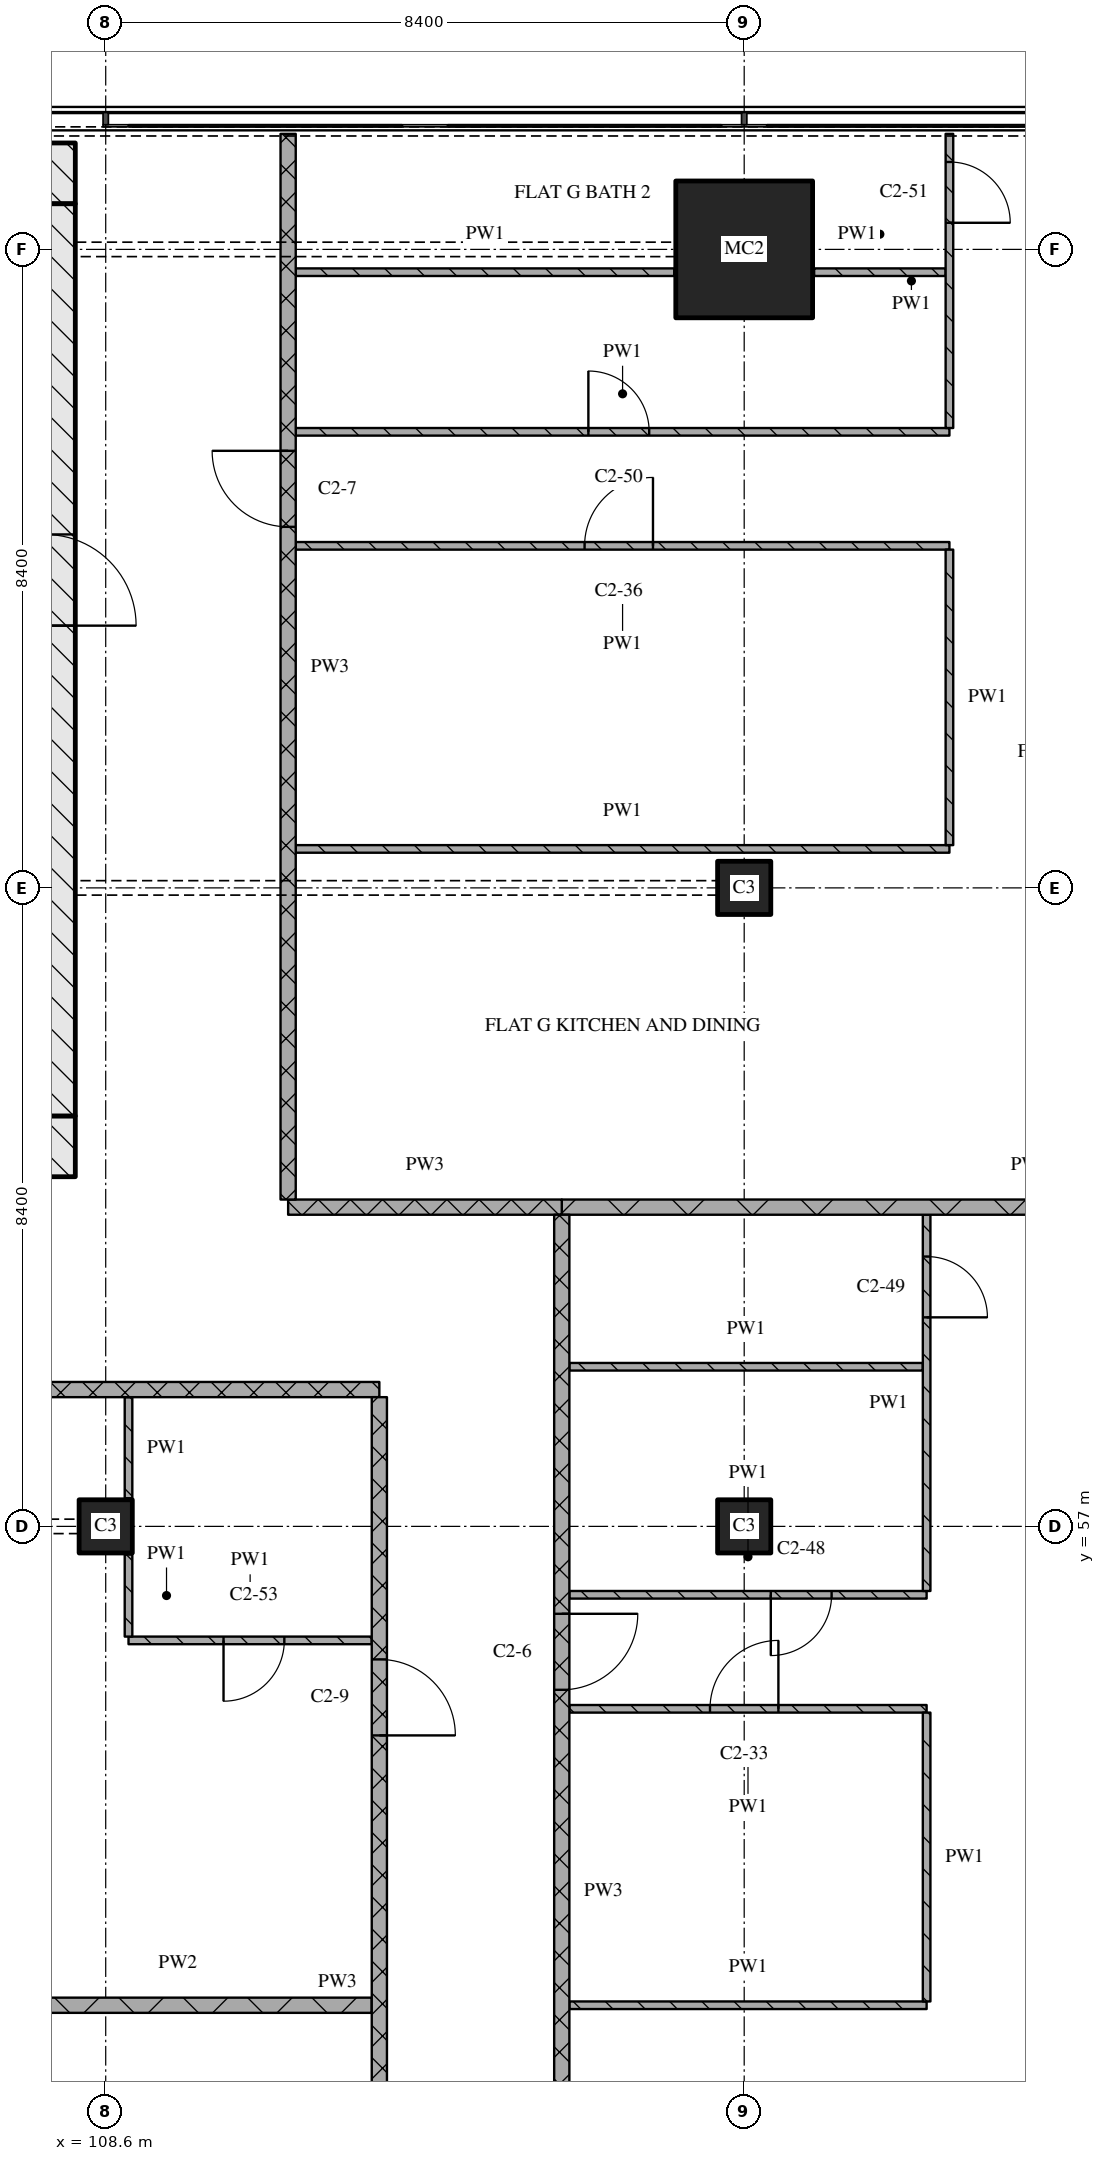
"""IFC4 building model, lengths in metres.
Left out: names, types, materials, properties, quantities, classifications, styles, units other than length and angle.
Written with IfcOpenShell. Run it as: python <this file> out.ifc"""

import sys

from ifc_helpers import new_model, si_unit, direction, frame, frame_2d, origin, origin_2d, place, context, subcontext, project, spatial, rectangle, extrude, element, fill, save


model = new_model("IFC4")
c1 = context("Model", 3, precision=1e-05, world=origin(), true_north=direction((0.0, 1.0)))
c2 = subcontext(c1, "Body", "Model", "MODEL_VIEW")
j1 = project(units=[si_unit("LENGTHUNIT", "METRE"), si_unit("PLANEANGLEUNIT", "RADIAN")], contexts=[c1])
p1 = place(None, origin())
s1 = spatial("IfcSite", under=j1, at=p1, CompositionType="ELEMENT")
p2 = place(p1, origin())
s2 = spatial("IfcBuilding", under=s1, at=p2, CompositionType="ELEMENT")
p3 = place(p2, frame((0.0, 0.0, 158.25)))
s3 = spatial("IfcBuildingStorey", under=s2, at=p3, CompositionType="ELEMENT", Elevation=158.25)
for number, where, z_axis, x_axis in (
    (1, (108.6, 57.0, 0.0), (0.0, 0.0, 1.0), (1.0, 0.0, 0.0)),
    (2, (117.0, 57.0, 0.0), (0.0, 0.0, 1.0), (1.0, 0.0, 0.0)),
    (3, (117.0, 65.4, 0.0), (0.0, 0.0, 1.0), (1.0, 0.0, 0.0)),
):
    element("IfcColumn", number, at=place(p3, frame(where, z_axis=z_axis, x_axis=x_axis)), inside=s3, PredefinedType="COLUMN", context=c2, shape_type="SweptSolid", body=[
        extrude(rectangle(XDim=0.7, YDim=0.7, at=origin_2d()), origin(), (0.0, 0.0, 1.0), 3.6),
    ])
p4 = place(p3, frame((117.0, 73.8, 0.0), z_axis=(0.0, 0.0, 1.0), x_axis=(1.0, 0.0, 0.0)))
e4 = element("IfcColumn", 4, at=p4, inside=s3, PredefinedType="COLUMN", context=c2, shape_type="SweptSolid", body=[
    extrude(rectangle(XDim=1.8, YDim=1.8, at=origin_2d()), origin(), (0.0, 0.0, 1.0), 3.6),
])
p5 = place(p3, frame((67.0, 62.0, 0.0), z_axis=(0.0, 0.0, 1.0), x_axis=(1.0, 0.0, 0.0)))
e5 = element("IfcWall", 5, at=p5, inside=s3, PredefinedType="SOLIDWALL", context=c2, shape_type="SweptSolid", body=[
    extrude(rectangle(XDim=41.2, YDim=0.8, at=frame_2d((20.6, 0.0))), origin(), (0.0, 0.0, 1.0), 3.32),
])
p6 = place(p5, frame((20.95, 0.0, 0.0)))
e6 = element("IfcOpeningElement", 6, at=p6, cuts=e5, PredefinedType="OPENING", context=c2, shape_type="SweptSolid", body=[
    extrude(rectangle(XDim=1.8, YDim=2.1, at=frame_2d((0.9, 1.05))), frame((0.0, 0.41, 0.0), z_axis=(0.0, -1.0, 0.0), x_axis=(1.0, 0.0, 0.0)), (0.0, 0.0, 1.0), 0.82),
])
p7 = place(p3, frame((67.0, 74.8, 0.0), z_axis=(0.0, 0.0, 1.0), x_axis=(1.0, 0.0, 0.0)))
e7 = element("IfcWall", 7, at=p7, inside=s3, PredefinedType="SOLIDWALL", context=c2, shape_type="SweptSolid", body=[
    extrude(rectangle(XDim=41.2, YDim=0.8, at=frame_2d((20.6, 0.0))), origin(), (0.0, 0.0, 1.0), 3.32),
])
p8 = place(p3, frame((107.8, 62.4, 0.0), z_axis=(0.0, 0.0, 1.0), x_axis=(0.0, 1.0, 0.0)))
e8 = element("IfcWall", 8, at=p8, inside=s3, PredefinedType="SOLIDWALL", context=c2, shape_type="SweptSolid", body=[
    extrude(rectangle(XDim=12.0, YDim=0.8, at=frame_2d((6.0, 0.0))), origin(), (0.0, 0.0, 1.0), 3.32),
])
p9 = place(p8, frame((6.45, 0.0, 0.0)))
e9 = element("IfcOpeningElement", 9, at=p9, cuts=e8, PredefinedType="OPENING", context=c2, shape_type="SweptSolid", body=[
    extrude(rectangle(XDim=1.2, YDim=2.1, at=frame_2d((0.6, 1.05))), frame((0.0, 0.41, 0.0), z_axis=(0.0, -1.0, 0.0), x_axis=(1.0, 0.0, 0.0)), (0.0, 0.0, 1.0), 0.82),
])
p10 = place(p3, frame((107.0, 50.7, 0.0), z_axis=(0.0, 0.0, 1.0), x_axis=(1.0, 0.0, 0.0)))
e10 = element("IfcWall", 10, at=p10, inside=s3, PredefinedType="PARTITIONING", context=c2, shape_type="SweptSolid", body=[
    extrude(rectangle(XDim=5.1, YDim=0.2, at=frame_2d((2.55, 0.0))), origin(), (0.0, 0.0, 1.0), 3.32),
])
p11 = place(p3, frame((114.7, 50.7, 0.0), z_axis=(0.0, 0.0, 1.0), x_axis=(1.0, 0.0, 0.0)))
e11 = element("IfcWall", 11, at=p11, inside=s3, PredefinedType="PARTITIONING", context=c2, shape_type="SweptSolid", body=[
    extrude(rectangle(XDim=4.7, YDim=0.1, at=frame_2d((2.35, 0.0))), origin(), (0.0, 0.0, 1.0), 3.32),
])
p12 = place(p3, frame((119.4, 54.6, 0.0), z_axis=(0.0, 0.0, 1.0), x_axis=(-1.0, 0.0, 0.0)))
e12 = element("IfcWall", 12, at=p12, inside=s3, PredefinedType="PARTITIONING", context=c2, shape_type="SweptSolid", body=[
    extrude(rectangle(XDim=4.7, YDim=0.1, at=frame_2d((2.35, 0.0))), origin(), (0.0, 0.0, 1.0), 3.32),
])
p13 = place(p12, frame((1.95, 0.0, 0.0)))
e13 = element("IfcOpeningElement", 13, at=p13, cuts=e12, PredefinedType="OPENING", context=c2, shape_type="SweptSolid", body=[
    extrude(rectangle(XDim=0.9, YDim=2.1, at=frame_2d((0.45, 1.05))), frame((0.0, 0.06, 0.0), z_axis=(0.0, -1.0, 0.0), x_axis=(1.0, 0.0, 0.0)), (0.0, 0.0, 1.0), 0.12),
])
p14 = place(p3, frame((108.9, 55.5, 0.0), z_axis=(0.0, 0.0, 1.0), x_axis=(1.0, 0.0, 0.0)))
e14 = element("IfcWall", 14, at=p14, inside=s3, PredefinedType="PARTITIONING", context=c2, shape_type="SweptSolid", body=[
    extrude(rectangle(XDim=3.2, YDim=0.1, at=frame_2d((1.6, 0.0))), origin(), (0.0, 0.0, 1.0), 3.32),
])
p15 = place(p14, frame((1.25, 0.0, 0.0)))
e15 = element("IfcOpeningElement", 15, at=p15, cuts=e14, PredefinedType="OPENING", context=c2, shape_type="SweptSolid", body=[
    extrude(rectangle(XDim=0.8, YDim=2.1, at=frame_2d((0.4, 1.05))), frame((0.0, 0.06, 0.0), z_axis=(0.0, -1.0, 0.0), x_axis=(1.0, 0.0, 0.0)), (0.0, 0.0, 1.0), 0.12),
])
p16 = place(p3, frame((114.7, 56.1, 0.0), z_axis=(0.0, 0.0, 1.0), x_axis=(1.0, 0.0, 0.0)))
e16 = element("IfcWall", 16, at=p16, inside=s3, PredefinedType="PARTITIONING", context=c2, shape_type="SweptSolid", body=[
    extrude(rectangle(XDim=4.7, YDim=0.1, at=frame_2d((2.35, 0.0))), origin(), (0.0, 0.0, 1.0), 3.32),
])
p17 = place(p16, frame((2.65, 0.0, 0.0)))
e17 = element("IfcOpeningElement", 17, at=p17, cuts=e16, PredefinedType="OPENING", context=c2, shape_type="SweptSolid", body=[
    extrude(rectangle(XDim=0.8, YDim=2.1, at=frame_2d((0.4, 1.05))), frame((0.0, 0.06, 0.0), z_axis=(0.0, -1.0, 0.0), x_axis=(1.0, 0.0, 0.0)), (0.0, 0.0, 1.0), 0.12),
])
p18 = place(p3, frame((101.4, 58.8, 0.0), z_axis=(0.0, 0.0, 1.0), x_axis=(1.0, 0.0, 0.0)))
e18 = element("IfcWall", 18, at=p18, inside=s3, PredefinedType="PARTITIONING", context=c2, shape_type="SweptSolid", body=[
    extrude(rectangle(XDim=10.8, YDim=0.2, at=frame_2d((5.4, 0.0))), origin(), (0.0, 0.0, 1.0), 3.32),
])
p19 = place(p3, frame((114.7, 59.1, 0.0), z_axis=(0.0, 0.0, 1.0), x_axis=(1.0, 0.0, 0.0)))
e19 = element("IfcWall", 19, at=p19, inside=s3, PredefinedType="PARTITIONING", context=c2, shape_type="SweptSolid", body=[
    extrude(rectangle(XDim=4.65, YDim=0.1, at=frame_2d((2.325, 0.0))), origin(), (0.0, 0.0, 1.0), 3.32),
])
p20 = place(p3, frame((111.0, 61.2, 0.0), z_axis=(0.0, 0.0, 1.0), x_axis=(1.0, 0.0, 0.0)))
e20 = element("IfcWall", 20, at=p20, inside=s3, PredefinedType="PARTITIONING", context=c2, shape_type="SweptSolid", body=[
    extrude(rectangle(XDim=3.6, YDim=0.2, at=frame_2d((1.8, 0.0))), origin(), (0.0, 0.0, 1.0), 3.32),
])
p21 = place(p3, frame((114.6, 61.2, 0.0), z_axis=(0.0, 0.0, 1.0), x_axis=(1.0, 0.0, 0.0)))
e21 = element("IfcWall", 21, at=p21, inside=s3, PredefinedType="PARTITIONING", context=c2, shape_type="SweptSolid", body=[
    extrude(rectangle(XDim=12.32, YDim=0.2, at=frame_2d((6.16, 0.0))), origin(), (0.0, 0.0, 1.0), 3.32),
])
p22 = place(p3, frame((111.1, 65.913, 0.0), z_axis=(0.0, 0.0, 1.0), x_axis=(1.0, 0.0, 0.0)))
e22 = element("IfcWall", 22, at=p22, inside=s3, PredefinedType="PARTITIONING", context=c2, shape_type="SweptSolid", body=[
    extrude(rectangle(XDim=8.6, YDim=0.1, at=frame_2d((4.3, 0.0))), origin(), (0.0, 0.0, 1.0), 3.32),
])
p23 = place(p3, frame((119.7, 69.9, 0.0), z_axis=(0.0, 0.0, 1.0), x_axis=(-1.0, 0.0, 0.0)))
e23 = element("IfcWall", 23, at=p23, inside=s3, PredefinedType="PARTITIONING", context=c2, shape_type="SweptSolid", body=[
    extrude(rectangle(XDim=8.6, YDim=0.1, at=frame_2d((4.3, 0.0))), origin(), (0.0, 0.0, 1.0), 3.32),
])
p24 = place(p23, frame((3.9, 0.0, 0.0)))
e24 = element("IfcOpeningElement", 24, at=p24, cuts=e23, PredefinedType="OPENING", context=c2, shape_type="SweptSolid", body=[
    extrude(rectangle(XDim=0.9, YDim=2.1, at=frame_2d((0.45, 1.05))), frame((0.0, 0.06, 0.0), z_axis=(0.0, -1.0, 0.0), x_axis=(1.0, 0.0, 0.0)), (0.0, 0.0, 1.0), 0.12),
])
p25 = place(p3, frame((111.1, 71.4, 0.0), z_axis=(0.0, 0.0, 1.0), x_axis=(1.0, 0.0, 0.0)))
e25 = element("IfcWall", 25, at=p25, inside=s3, PredefinedType="PARTITIONING", context=c2, shape_type="SweptSolid", body=[
    extrude(rectangle(XDim=8.6, YDim=0.1, at=frame_2d((4.3, 0.0))), origin(), (0.0, 0.0, 1.0), 3.32),
])
p26 = place(p25, frame((3.85, 0.0, 0.0)))
e26 = element("IfcOpeningElement", 26, at=p26, cuts=e25, PredefinedType="OPENING", context=c2, shape_type="SweptSolid", body=[
    extrude(rectangle(XDim=0.8, YDim=2.1, at=frame_2d((0.4, 1.05))), frame((0.0, 0.06, 0.0), z_axis=(0.0, -1.0, 0.0), x_axis=(1.0, 0.0, 0.0)), (0.0, 0.0, 1.0), 0.12),
])
p27 = place(p3, frame((111.1, 73.5, 0.0), z_axis=(0.0, 0.0, 1.0), x_axis=(1.0, 0.0, 0.0)))
e27 = element("IfcWall", 27, at=p27, inside=s3, PredefinedType="PARTITIONING", context=c2, shape_type="SweptSolid", body=[
    extrude(rectangle(XDim=4.98, YDim=0.1, at=frame_2d((2.49, 0.0))), origin(), (0.0, 0.0, 1.0), 3.32),
])
p28 = place(p3, frame((117.92, 73.5, 0.0), z_axis=(0.0, 0.0, 1.0), x_axis=(1.0, 0.0, 0.0)))
e28 = element("IfcWall", 28, at=p28, inside=s3, PredefinedType="PARTITIONING", context=c2, shape_type="SweptSolid", body=[
    extrude(rectangle(XDim=1.73, YDim=0.1, at=frame_2d((0.865, 0.0))), origin(), (0.0, 0.0, 1.0), 3.32),
])
p29 = place(p3, frame((108.9, 56.63, 0.0), z_axis=(0.0, 0.0, 1.0), x_axis=(0.0, -1.0, 0.0)))
e29 = element("IfcWall", 29, at=p29, inside=s3, PredefinedType="PARTITIONING", context=c2, shape_type="SweptSolid", body=[
    extrude(rectangle(XDim=1.08, YDim=0.1, at=frame_2d((0.54, 0.0))), origin(), (0.0, 0.0, 1.0), 3.32),
])
p30 = place(p3, frame((108.9, 58.7, 0.0), z_axis=(0.0, 0.0, 1.0), x_axis=(0.0, -1.0, 0.0)))
e30 = element("IfcWall", 30, at=p30, inside=s3, PredefinedType="PARTITIONING", context=c2, shape_type="SweptSolid", body=[
    extrude(rectangle(XDim=1.33, YDim=0.1, at=frame_2d((0.665, 0.0))), origin(), (0.0, 0.0, 1.0), 3.32),
])
p31 = place(p3, frame((111.0, 75.32, 0.0), z_axis=(0.0, 0.0, 1.0), x_axis=(0.0, -1.0, 0.0)))
e31 = element("IfcWall", 31, at=p31, inside=s3, PredefinedType="PARTITIONING", context=c2, shape_type="SweptSolid", body=[
    extrude(rectangle(XDim=14.02, YDim=0.2, at=frame_2d((7.01, 0.0))), origin(), (0.0, 0.0, 1.0), 3.32),
])
p32 = place(p31, frame((4.17, 0.0, 0.0)))
e32 = element("IfcOpeningElement", 32, at=p32, cuts=e31, PredefinedType="OPENING", context=c2, shape_type="SweptSolid", body=[
    extrude(rectangle(XDim=1.0, YDim=2.1, at=frame_2d((0.5, 1.05))), frame((0.0, 0.11, 0.0), z_axis=(0.0, -1.0, 0.0), x_axis=(1.0, 0.0, 0.0)), (0.0, 0.0, 1.0), 0.22),
])
p33 = place(p3, frame((112.2, 43.3, 0.0), z_axis=(0.0, 0.0, 1.0), x_axis=(0.0, 1.0, 0.0)))
e33 = element("IfcWall", 33, at=p33, inside=s3, PredefinedType="PARTITIONING", context=c2, shape_type="SweptSolid", body=[
    extrude(rectangle(XDim=15.4, YDim=0.2, at=frame_2d((7.7, 0.0))), origin(), (0.0, 0.0, 1.0), 3.32),
])
p34 = place(p33, frame((10.95, 0.0, 0.0)))
e34 = element("IfcOpeningElement", 34, at=p34, cuts=e33, PredefinedType="OPENING", context=c2, shape_type="SweptSolid", body=[
    extrude(rectangle(XDim=1.0, YDim=2.1, at=frame_2d((0.5, 1.05))), frame((0.0, 0.11, 0.0), z_axis=(0.0, -1.0, 0.0), x_axis=(1.0, 0.0, 0.0)), (0.0, 0.0, 1.0), 0.22),
])
p35 = place(p3, frame((114.6, 61.1, 0.0), z_axis=(0.0, 0.0, 1.0), x_axis=(0.0, -1.0, 0.0)))
e35 = element("IfcWall", 35, at=p35, inside=s3, PredefinedType="PARTITIONING", context=c2, shape_type="SweptSolid", body=[
    extrude(rectangle(XDim=17.8, YDim=0.2, at=frame_2d((8.9, 0.0))), origin(), (0.0, 0.0, 1.0), 3.32),
])
p36 = place(p35, frame((5.25, 0.0, 0.0)))
e36 = element("IfcOpeningElement", 36, at=p36, cuts=e35, PredefinedType="OPENING", context=c2, shape_type="SweptSolid", body=[
    extrude(rectangle(XDim=1.0, YDim=2.1, at=frame_2d((0.5, 1.05))), frame((0.0, 0.11, 0.0), z_axis=(0.0, -1.0, 0.0), x_axis=(1.0, 0.0, 0.0)), (0.0, 0.0, 1.0), 0.22),
])
p37 = place(p3, frame((119.4, 54.55, 0.0), z_axis=(0.0, 0.0, 1.0), x_axis=(0.0, -1.0, 0.0)))
e37 = element("IfcWall", 37, at=p37, inside=s3, PredefinedType="PARTITIONING", context=c2, shape_type="SweptSolid", body=[
    extrude(rectangle(XDim=3.8, YDim=0.1, at=frame_2d((1.9, 0.0))), origin(), (0.0, 0.0, 1.0), 3.32),
])
p38 = place(p3, frame((119.4, 56.15, 0.0), z_axis=(0.0, 0.0, 1.0), x_axis=(0.0, 1.0, 0.0)))
e38 = element("IfcWall", 38, at=p38, inside=s3, PredefinedType="PARTITIONING", context=c2, shape_type="SweptSolid", body=[
    extrude(rectangle(XDim=4.95, YDim=0.1, at=frame_2d((2.475, 0.0))), origin(), (0.0, 0.0, 1.0), 3.32),
])
p39 = place(p38, frame((3.6, 0.0, 0.0)))
e39 = element("IfcOpeningElement", 39, at=p39, cuts=e38, PredefinedType="OPENING", context=c2, shape_type="SweptSolid", body=[
    extrude(rectangle(XDim=0.8, YDim=2.1, at=frame_2d((0.4, 1.05))), frame((0.0, 0.06, 0.0), z_axis=(0.0, -1.0, 0.0), x_axis=(1.0, 0.0, 0.0)), (0.0, 0.0, 1.0), 0.12),
])
p40 = place(p3, frame((119.7, 69.85, 0.0), z_axis=(0.0, 0.0, 1.0), x_axis=(0.0, -1.0, 0.0)))
e40 = element("IfcWall", 40, at=p40, inside=s3, PredefinedType="PARTITIONING", context=c2, shape_type="SweptSolid", body=[
    extrude(rectangle(XDim=3.887, YDim=0.1, at=frame_2d((1.944, 0.0))), origin(), (0.0, 0.0, 1.0), 3.32),
])
p41 = place(p3, frame((119.7, 71.45, 0.0), z_axis=(0.0, 0.0, 1.0), x_axis=(0.0, 1.0, 0.0)))
e41 = element("IfcWall", 41, at=p41, inside=s3, PredefinedType="PARTITIONING", context=c2, shape_type="SweptSolid", body=[
    extrude(rectangle(XDim=3.87, YDim=0.1, at=frame_2d((1.935, 0.0))), origin(), (0.0, 0.0, 1.0), 3.32),
])
p42 = place(p41, frame((2.7, 0.0, 0.0)))
e42 = element("IfcOpeningElement", 42, at=p42, cuts=e41, PredefinedType="OPENING", context=c2, shape_type="SweptSolid", body=[
    extrude(rectangle(XDim=0.8, YDim=2.1, at=frame_2d((0.4, 1.05))), frame((0.0, 0.06, 0.0), z_axis=(0.0, -1.0, 0.0), x_axis=(1.0, 0.0, 0.0)), (0.0, 0.0, 1.0), 0.12),
])
p43 = place(p13, origin())
e43 = element("IfcDoor", 43, at=p43, inside=s3, OperationType="SINGLE_SWING_RIGHT", PredefinedType="DOOR", context=c2, shape_type="SweptSolid", body=[
    extrude(rectangle(XDim=0.9, YDim=2.1, at=frame_2d((0.45, 1.05))), frame((0.0, 0.025, 0.0), z_axis=(0.0, -1.0, 0.0), x_axis=(1.0, 0.0, 0.0)), (0.0, 0.0, 1.0), 0.05),
])
fill(e13, e43)
p44 = place(p15, origin())
e44 = element("IfcDoor", 44, at=p44, inside=s3, OperationType="SINGLE_SWING_RIGHT", PredefinedType="DOOR", context=c2, shape_type="SweptSolid", body=[
    extrude(rectangle(XDim=0.8, YDim=2.1, at=frame_2d((0.4, 1.05))), frame((0.0, 0.025, 0.0), z_axis=(0.0, -1.0, 0.0), x_axis=(1.0, 0.0, 0.0)), (0.0, 0.0, 1.0), 0.05),
])
fill(e15, e44)
p45 = place(p17, origin())
e45 = element("IfcDoor", 45, at=p45, inside=s3, OperationType="SINGLE_SWING_RIGHT", PredefinedType="DOOR", context=c2, shape_type="SweptSolid", body=[
    extrude(rectangle(XDim=0.8, YDim=2.1, at=frame_2d((0.4, 1.05))), frame((0.0, 0.025, 0.0), z_axis=(0.0, -1.0, 0.0), x_axis=(1.0, 0.0, 0.0)), (0.0, 0.0, 1.0), 0.05),
])
fill(e17, e45)
p46 = place(p24, origin())
e46 = element("IfcDoor", 46, at=p46, inside=s3, OperationType="SINGLE_SWING_RIGHT", PredefinedType="DOOR", context=c2, shape_type="SweptSolid", body=[
    extrude(rectangle(XDim=0.9, YDim=2.1, at=frame_2d((0.45, 1.05))), frame((0.0, 0.025, 0.0), z_axis=(0.0, -1.0, 0.0), x_axis=(1.0, 0.0, 0.0)), (0.0, 0.0, 1.0), 0.05),
])
fill(e24, e46)
p47 = place(p26, origin())
e47 = element("IfcDoor", 47, at=p47, inside=s3, OperationType="SINGLE_SWING_LEFT", PredefinedType="DOOR", context=c2, shape_type="SweptSolid", body=[
    extrude(rectangle(XDim=0.8, YDim=2.1, at=frame_2d((0.4, 1.05))), frame((0.0, 0.025, 0.0), z_axis=(0.0, -1.0, 0.0), x_axis=(1.0, 0.0, 0.0)), (0.0, 0.0, 1.0), 0.05),
])
fill(e26, e47)
p48 = place(p32, origin())
e48 = element("IfcDoor", 48, at=p48, inside=s3, OperationType="SINGLE_SWING_RIGHT", PredefinedType="DOOR", context=c2, shape_type="SweptSolid", body=[
    extrude(rectangle(XDim=1.0, YDim=2.1, at=frame_2d((0.5, 1.05))), frame((0.0, 0.025, 0.0), z_axis=(0.0, -1.0, 0.0), x_axis=(1.0, 0.0, 0.0)), (0.0, 0.0, 1.0), 0.05),
])
fill(e32, e48)
p49 = place(p34, origin())
e49 = element("IfcDoor", 49, at=p49, inside=s3, OperationType="SINGLE_SWING_RIGHT", PredefinedType="DOOR", context=c2, shape_type="SweptSolid", body=[
    extrude(rectangle(XDim=1.0, YDim=2.1, at=frame_2d((0.5, 1.05))), frame((0.0, 0.025, 0.0), z_axis=(0.0, -1.0, 0.0), x_axis=(1.0, 0.0, 0.0)), (0.0, 0.0, 1.0), 0.05),
])
fill(e34, e49)
p50 = place(p36, origin())
e50 = element("IfcDoor", 50, at=p50, inside=s3, OperationType="SINGLE_SWING_LEFT", PredefinedType="DOOR", context=c2, shape_type="SweptSolid", body=[
    extrude(rectangle(XDim=1.0, YDim=2.1, at=frame_2d((0.5, 1.05))), frame((0.0, 0.025, 0.0), z_axis=(0.0, -1.0, 0.0), x_axis=(1.0, 0.0, 0.0)), (0.0, 0.0, 1.0), 0.05),
])
fill(e36, e50)
p51 = place(p39, origin())
e51 = element("IfcDoor", 51, at=p51, inside=s3, OperationType="SINGLE_SWING_RIGHT", PredefinedType="DOOR", context=c2, shape_type="SweptSolid", body=[
    extrude(rectangle(XDim=0.8, YDim=2.1, at=frame_2d((0.4, 1.05))), frame((0.0, 0.025, 0.0), z_axis=(0.0, -1.0, 0.0), x_axis=(1.0, 0.0, 0.0)), (0.0, 0.0, 1.0), 0.05),
])
fill(e39, e51)
p52 = place(p42, origin())
e52 = element("IfcDoor", 52, at=p52, inside=s3, OperationType="SINGLE_SWING_RIGHT", PredefinedType="DOOR", context=c2, shape_type="SweptSolid", body=[
    extrude(rectangle(XDim=0.8, YDim=2.1, at=frame_2d((0.4, 1.05))), frame((0.0, 0.025, 0.0), z_axis=(0.0, -1.0, 0.0), x_axis=(1.0, 0.0, 0.0)), (0.0, 0.0, 1.0), 0.05),
])
fill(e42, e52)
save(model, sys.argv[1])
